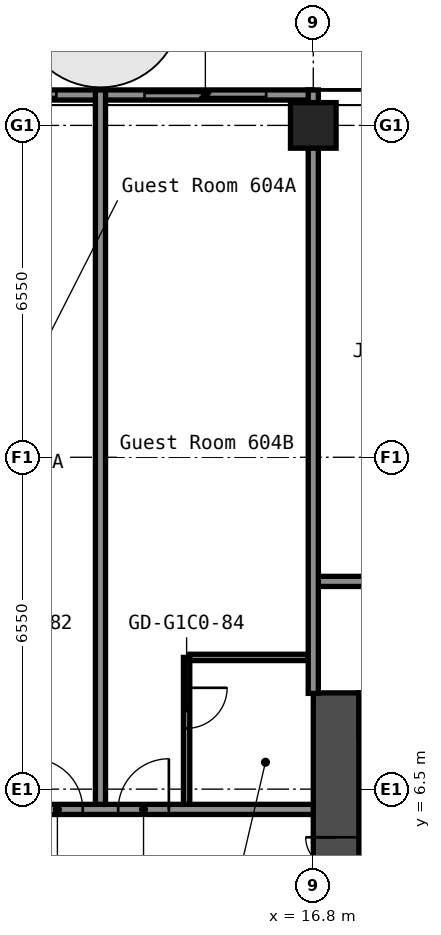
"""IFC4 building model, lengths in metres.
Left out: names, types, materials, properties, quantities, classifications, styles, units other than length and angle.
Written with IfcOpenShell. Run it as: python <this file> out.ifc"""

import sys

from ifc_helpers import new_model, si_unit, direction, frame, frame_2d, origin, origin_2d, place, context, subcontext, project, spatial, rectangle, hollow_rectangle, extrude, element, fill, save


model = new_model("IFC4")
c1 = context("Model", 3, precision=1e-05, world=origin(), true_north=direction((0.0, 1.0)))
c2 = subcontext(c1, "Body", "Model", "MODEL_VIEW")
j1 = project(units=[si_unit("LENGTHUNIT", "METRE"), si_unit("PLANEANGLEUNIT", "RADIAN")], contexts=[c1])
p1 = place(None, origin())
s1 = spatial("IfcSite", under=j1, at=p1, CompositionType="ELEMENT")
p2 = place(p1, origin())
s2 = spatial("IfcBuilding", under=s1, at=p2, CompositionType="ELEMENT")
p3 = place(p2, frame((0.0, 0.0, 26.2)))
s3 = spatial("IfcBuildingStorey", under=s2, at=p3, CompositionType="ELEMENT", Elevation=26.2)
p4 = place(p3, frame((16.8, 19.6, 0.0), z_axis=(0.0, 0.0, 1.0), x_axis=(1.0, 0.0, 0.0)))
e1 = element("IfcColumn", 1, at=p4, inside=s3, PredefinedType="COLUMN", context=c2, shape_type="SweptSolid", body=[
    extrude(hollow_rectangle(XDim=0.9, YDim=0.9, WallThickness=0.036, at=origin_2d()), origin(), (0.0, 0.0, 1.0), 2.8),
])
p5 = place(p3, frame((17.25, -8.4, 0.0), z_axis=(0.0, 0.0, 1.0), x_axis=(0.0, 1.0, 0.0)))
e2 = element("IfcWall", 2, at=p5, inside=s3, PredefinedType="SHEAR", context=c2, shape_type="SweptSolid", body=[
    extrude(rectangle(XDim=16.8, YDim=0.9, at=frame_2d((8.4, 0.0))), origin(), (0.0, 0.0, 1.0), 2.8),
])
p6 = place(p5, frame((12.75, 0.0, 0.0)))
e3 = element("IfcOpeningElement", 3, at=p6, cuts=e2, PredefinedType="OPENING", context=c2, shape_type="SweptSolid", body=[
    extrude(rectangle(XDim=1.2, YDim=2.1, at=frame_2d((0.6, 1.05))), frame((0.0, 0.46, 0.0), z_axis=(0.0, -1.0, 0.0), x_axis=(1.0, 0.0, 0.0)), (0.0, 0.0, 1.0), 0.92),
])
p7 = place(p5, frame((2.85, 0.0, 0.0)))
e4 = element("IfcOpeningElement", 4, at=p7, cuts=e2, PredefinedType="OPENING", context=c2, shape_type="SweptSolid", body=[
    extrude(rectangle(XDim=1.2, YDim=2.1, at=frame_2d((0.6, 1.05))), frame((0.0, 0.46, 0.0), z_axis=(0.0, -1.0, 0.0), x_axis=(1.0, 0.0, 0.0)), (0.0, 0.0, 1.0), 0.92),
])
p8 = place(p3, frame((17.7, 7.95, 0.0), z_axis=(0.0, 0.0, 1.0), x_axis=(1.0, 0.0, 0.0)))
e5 = element("IfcWall", 5, at=p8, inside=s3, PredefinedType="SHEAR", context=c2, shape_type="SweptSolid", body=[
    extrude(rectangle(XDim=15.0, YDim=0.9, at=frame_2d((7.5, 0.0))), origin(), (0.0, 0.0, 1.0), 2.8),
])
p9 = place(p8, frame((10.4, 0.0, 0.0)))
e6 = element("IfcOpeningElement", 6, at=p9, cuts=e5, PredefinedType="OPENING", context=c2, shape_type="SweptSolid", body=[
    extrude(rectangle(XDim=1.2, YDim=2.1, at=frame_2d((0.6, 1.05))), frame((0.0, 0.46, 0.0), z_axis=(0.0, -1.0, 0.0), x_axis=(1.0, 0.0, 0.0)), (0.0, 0.0, 1.0), 0.92),
])
p10 = place(p8, frame((13.35, 0.0, 0.0)))
e7 = element("IfcOpeningElement", 7, at=p10, cuts=e5, PredefinedType="OPENING", context=c2, shape_type="SweptSolid", body=[
    extrude(rectangle(XDim=0.9, YDim=2.1, at=frame_2d((0.45, 1.05))), frame((0.0, 0.46, 0.0), z_axis=(0.0, -1.0, 0.0), x_axis=(1.0, 0.0, 0.0)), (0.0, 0.0, 1.0), 0.92),
])
p11 = place(p3, frame((-16.8, 6.1, 0.0), z_axis=(0.0, 0.0, 1.0), x_axis=(1.0, 0.0, 0.0)))
e8 = element("IfcWall", 8, at=p11, inside=s3, PredefinedType="PARTITIONING", context=c2, shape_type="SweptSolid", body=[
    extrude(rectangle(XDim=33.6, YDim=0.2, at=frame_2d((16.8, 0.0))), origin(), (0.0, 0.0, 1.0), 2.8),
])
p12 = place(p11, frame((2.0, 0.0, 0.0)))
e9 = element("IfcOpeningElement", 9, at=p12, cuts=e8, PredefinedType="OPENING", context=c2, shape_type="SweptSolid", body=[
    extrude(rectangle(XDim=1.0, YDim=2.1, at=frame_2d((0.5, 1.05))), frame((0.0, 0.11, 0.0), z_axis=(0.0, -1.0, 0.0), x_axis=(1.0, 0.0, 0.0)), (0.0, 0.0, 1.0), 0.22),
])
p13 = place(p11, frame((11.25, 0.0, 0.0)))
e10 = element("IfcOpeningElement", 10, at=p13, cuts=e8, PredefinedType="OPENING", context=c2, shape_type="SweptSolid", body=[
    extrude(rectangle(XDim=1.0, YDim=2.1, at=frame_2d((0.5, 1.05))), frame((0.0, 0.11, 0.0), z_axis=(0.0, -1.0, 0.0), x_axis=(1.0, 0.0, 0.0)), (0.0, 0.0, 1.0), 0.22),
])
p14 = place(p11, frame((12.95, 0.0, 0.0)))
e11 = element("IfcOpeningElement", 11, at=p14, cuts=e8, PredefinedType="OPENING", context=c2, shape_type="SweptSolid", body=[
    extrude(rectangle(XDim=1.0, YDim=2.1, at=frame_2d((0.5, 1.05))), frame((0.0, 0.11, 0.0), z_axis=(0.0, -1.0, 0.0), x_axis=(1.0, 0.0, 0.0)), (0.0, 0.0, 1.0), 0.22),
])
p15 = place(p11, frame((18.7, 0.0, 0.0)))
e12 = element("IfcOpeningElement", 12, at=p15, cuts=e8, PredefinedType="OPENING", context=c2, shape_type="SweptSolid", body=[
    extrude(rectangle(XDim=0.9, YDim=2.1, at=frame_2d((0.45, 1.05))), frame((0.0, 0.11, 0.0), z_axis=(0.0, -1.0, 0.0), x_axis=(1.0, 0.0, 0.0)), (0.0, 0.0, 1.0), 0.22),
])
p16 = place(p11, frame((22.9, 0.0, 0.0)))
e13 = element("IfcOpeningElement", 13, at=p16, cuts=e8, PredefinedType="OPENING", context=c2, shape_type="SweptSolid", body=[
    extrude(rectangle(XDim=0.9, YDim=2.1, at=frame_2d((0.45, 1.05))), frame((0.0, 0.11, 0.0), z_axis=(0.0, -1.0, 0.0), x_axis=(1.0, 0.0, 0.0)), (0.0, 0.0, 1.0), 0.22),
])
p17 = place(p11, frame((28.05, 0.0, 0.0)))
e14 = element("IfcOpeningElement", 14, at=p17, cuts=e8, PredefinedType="OPENING", context=c2, shape_type="SweptSolid", body=[
    extrude(rectangle(XDim=1.0, YDim=2.1, at=frame_2d((0.5, 1.05))), frame((0.0, 0.11, 0.0), z_axis=(0.0, -1.0, 0.0), x_axis=(1.0, 0.0, 0.0)), (0.0, 0.0, 1.0), 0.22),
])
p18 = place(p11, frame((29.75, 0.0, 0.0)))
e15 = element("IfcOpeningElement", 15, at=p18, cuts=e8, PredefinedType="OPENING", context=c2, shape_type="SweptSolid", body=[
    extrude(rectangle(XDim=1.0, YDim=2.1, at=frame_2d((0.5, 1.05))), frame((0.0, 0.11, 0.0), z_axis=(0.0, -1.0, 0.0), x_axis=(1.0, 0.0, 0.0)), (0.0, 0.0, 1.0), 0.22),
])
p19 = place(p3, frame((14.363, 9.1, 0.0), z_axis=(0.0, 0.0, 1.0), x_axis=(1.0, 0.0, 0.0)))
e16 = element("IfcWall", 16, at=p19, inside=s3, PredefinedType="PARTITIONING", context=c2, shape_type="SweptSolid", body=[
    extrude(rectangle(XDim=2.337, YDim=0.125, at=frame_2d((1.169, 0.0))), origin(), (0.0, 0.0, 1.0), 2.8),
])
p20 = place(p3, frame((16.8, 10.6, 0.0), z_axis=(0.0, 0.0, 1.0), x_axis=(1.0, 0.0, 0.0)))
e17 = element("IfcWall", 17, at=p20, inside=s3, PredefinedType="PARTITIONING", context=c2, shape_type="SweptSolid", body=[
    extrude(rectangle(XDim=34.3, YDim=0.2, at=frame_2d((17.15, 0.0))), origin(), (0.0, 0.0, 1.0), 2.8),
])
p21 = place(p20, frame((2.0, 0.0, 0.0)))
e18 = element("IfcOpeningElement", 18, at=p21, cuts=e17, PredefinedType="OPENING", context=c2, shape_type="SweptSolid", body=[
    extrude(rectangle(XDim=1.0, YDim=2.1, at=frame_2d((0.5, 1.05))), frame((0.0, 0.11, 0.0), z_axis=(0.0, -1.0, 0.0), x_axis=(1.0, 0.0, 0.0)), (0.0, 0.0, 1.0), 0.22),
])
p22 = place(p20, frame((11.25, 0.0, 0.0)))
e19 = element("IfcOpeningElement", 19, at=p22, cuts=e17, PredefinedType="OPENING", context=c2, shape_type="SweptSolid", body=[
    extrude(rectangle(XDim=1.0, YDim=2.1, at=frame_2d((0.5, 1.05))), frame((0.0, 0.11, 0.0), z_axis=(0.0, -1.0, 0.0), x_axis=(1.0, 0.0, 0.0)), (0.0, 0.0, 1.0), 0.22),
])
p23 = place(p20, frame((12.95, 0.0, 0.0)))
e20 = element("IfcOpeningElement", 20, at=p23, cuts=e17, PredefinedType="OPENING", context=c2, shape_type="SweptSolid", body=[
    extrude(rectangle(XDim=1.0, YDim=2.1, at=frame_2d((0.5, 1.05))), frame((0.0, 0.11, 0.0), z_axis=(0.0, -1.0, 0.0), x_axis=(1.0, 0.0, 0.0)), (0.0, 0.0, 1.0), 0.22),
])
p24 = place(p20, frame((22.2, 0.0, 0.0)))
e21 = element("IfcOpeningElement", 21, at=p24, cuts=e17, PredefinedType="OPENING", context=c2, shape_type="SweptSolid", body=[
    extrude(rectangle(XDim=1.0, YDim=2.1, at=frame_2d((0.5, 1.05))), frame((0.0, 0.11, 0.0), z_axis=(0.0, -1.0, 0.0), x_axis=(1.0, 0.0, 0.0)), (0.0, 0.0, 1.0), 0.22),
])
p25 = place(p20, frame((28.15, 0.0, 0.0)))
e22 = element("IfcOpeningElement", 22, at=p25, cuts=e17, PredefinedType="OPENING", context=c2, shape_type="SweptSolid", body=[
    extrude(rectangle(XDim=1.0, YDim=2.1, at=frame_2d((0.5, 1.05))), frame((0.0, 0.11, 0.0), z_axis=(0.0, -1.0, 0.0), x_axis=(1.0, 0.0, 0.0)), (0.0, 0.0, 1.0), 0.22),
])
p26 = place(p20, frame((30.05, 0.0, 0.0)))
e23 = element("IfcOpeningElement", 23, at=p26, cuts=e17, PredefinedType="OPENING", context=c2, shape_type="SweptSolid", body=[
    extrude(rectangle(XDim=1.0, YDim=2.1, at=frame_2d((0.5, 1.05))), frame((0.0, 0.11, 0.0), z_axis=(0.0, -1.0, 0.0), x_axis=(1.0, 0.0, 0.0)), (0.0, 0.0, 1.0), 0.22),
])
p27 = place(p3, frame((12.6, 6.2, 0.0), z_axis=(0.0, 0.0, 1.0), x_axis=(0.0, 1.0, 0.0)))
e24 = element("IfcWall", 24, at=p27, inside=s3, PredefinedType="PARTITIONING", context=c2, shape_type="SweptSolid", body=[
    extrude(rectangle(XDim=14.1, YDim=0.2, at=frame_2d((7.05, 0.0))), origin(), (0.0, 0.0, 1.0), 2.8),
])
p28 = place(p3, frame((14.3, 6.2, 0.0), z_axis=(0.0, 0.0, 1.0), x_axis=(0.0, 1.0, 0.0)))
e25 = element("IfcWall", 25, at=p28, inside=s3, PredefinedType="PARTITIONING", context=c2, shape_type="SweptSolid", body=[
    extrude(rectangle(XDim=2.9, YDim=0.125, at=frame_2d((1.45, 0.0))), origin(), (0.0, 0.0, 1.0), 2.8),
])
p29 = place(p28, frame((1.5, 0.0, 0.0)))
e26 = element("IfcOpeningElement", 26, at=p29, cuts=e25, PredefinedType="OPENING", context=c2, shape_type="SweptSolid", body=[
    extrude(rectangle(XDim=0.8, YDim=2.1, at=frame_2d((0.4, 1.05))), frame((0.0, 0.073, 0.0), z_axis=(0.0, -1.0, 0.0), x_axis=(1.0, 0.0, 0.0)), (0.0, 0.0, 1.0), 0.145),
])
p30 = place(p3, frame((16.8, 8.39, 0.0), z_axis=(0.0, 0.0, 1.0), x_axis=(0.0, 1.0, 0.0)))
e27 = element("IfcWall", 27, at=p30, inside=s3, PredefinedType="PARTITIONING", context=c2, shape_type="SweptSolid", body=[
    extrude(rectangle(XDim=11.91, YDim=0.2, at=frame_2d((5.955, 0.0))), origin(), (0.0, 0.0, 1.0), 2.8),
])
p31 = place(p3, frame((16.78, 20.2, 0.0), z_axis=(0.0, 0.0, 1.0), x_axis=(-1.0, 0.0, 0.0)))
p32 = place(p31, frame((0.91, 0.0, 0.0)))
p33 = place(p32, frame((2.4, 0.0, 0.0), z_axis=(0.0, 0.0, 1.0), x_axis=(-1.0, 0.0, 0.0)))
e28 = element("IfcDoor", 28, at=p33, inside=s3, OperationType="SLIDING_TO_LEFT", PredefinedType="DOOR", context=c2, shape_type="SweptSolid", body=[
    extrude(rectangle(XDim=2.4, YDim=2.2, at=frame_2d((1.2, 1.1))), frame((0.0, 0.025, 0.0), z_axis=(0.0, -1.0, 0.0), x_axis=(1.0, 0.0, 0.0)), (0.0, 0.0, 1.0), 0.05),
])
p34 = place(p3, frame((12.64, 20.2, 0.0), z_axis=(0.0, 0.0, 1.0), x_axis=(-1.0, 0.0, 0.0)))
p35 = place(p34, frame((0.91, 0.0, 0.0)))
p36 = place(p35, frame((2.4, 0.0, 0.0), z_axis=(0.0, 0.0, 1.0), x_axis=(-1.0, 0.0, 0.0)))
e29 = element("IfcDoor", 29, at=p36, inside=s3, OperationType="SLIDING_TO_LEFT", PredefinedType="DOOR", context=c2, shape_type="SweptSolid", body=[
    extrude(rectangle(XDim=2.4, YDim=2.2, at=frame_2d((1.2, 1.1))), frame((0.0, 0.025, 0.0), z_axis=(0.0, -1.0, 0.0), x_axis=(1.0, 0.0, 0.0)), (0.0, 0.0, 1.0), 0.05),
])
p37 = place(p6, origin())
e30 = element("IfcDoor", 30, at=p37, inside=s3, OperationType="DOUBLE_DOOR_SINGLE_SWING", PredefinedType="DOOR", context=c2, shape_type="SweptSolid", body=[
    extrude(rectangle(XDim=1.2, YDim=2.1, at=frame_2d((0.6, 1.05))), frame((0.0, 0.025, 0.0), z_axis=(0.0, -1.0, 0.0), x_axis=(1.0, 0.0, 0.0)), (0.0, 0.0, 1.0), 0.05),
])
fill(e3, e30)
p38 = place(p17, origin())
e31 = element("IfcDoor", 31, at=p38, inside=s3, OperationType="SINGLE_SWING_RIGHT", PredefinedType="DOOR", context=c2, shape_type="SweptSolid", body=[
    extrude(rectangle(XDim=1.0, YDim=2.1, at=frame_2d((0.5, 1.05))), frame((0.0, 0.025, 0.0), z_axis=(0.0, -1.0, 0.0), x_axis=(1.0, 0.0, 0.0)), (0.0, 0.0, 1.0), 0.05),
])
fill(e14, e31)
p39 = place(p18, origin())
e32 = element("IfcDoor", 32, at=p39, inside=s3, OperationType="SINGLE_SWING_LEFT", PredefinedType="DOOR", context=c2, shape_type="SweptSolid", body=[
    extrude(rectangle(XDim=1.0, YDim=2.1, at=frame_2d((0.5, 1.05))), frame((0.0, 0.025, 0.0), z_axis=(0.0, -1.0, 0.0), x_axis=(1.0, 0.0, 0.0)), (0.0, 0.0, 1.0), 0.05),
])
fill(e15, e32)
p40 = place(p29, origin())
e33 = element("IfcDoor", 33, at=p40, inside=s3, OperationType="SINGLE_SWING_RIGHT", PredefinedType="DOOR", context=c2, shape_type="SweptSolid", body=[
    extrude(rectangle(XDim=0.8, YDim=2.1, at=frame_2d((0.4, 1.05))), frame((0.0, 0.025, 0.0), z_axis=(0.0, -1.0, 0.0), x_axis=(1.0, 0.0, 0.0)), (0.0, 0.0, 1.0), 0.05),
])
fill(e26, e33)
save(model, sys.argv[1])
